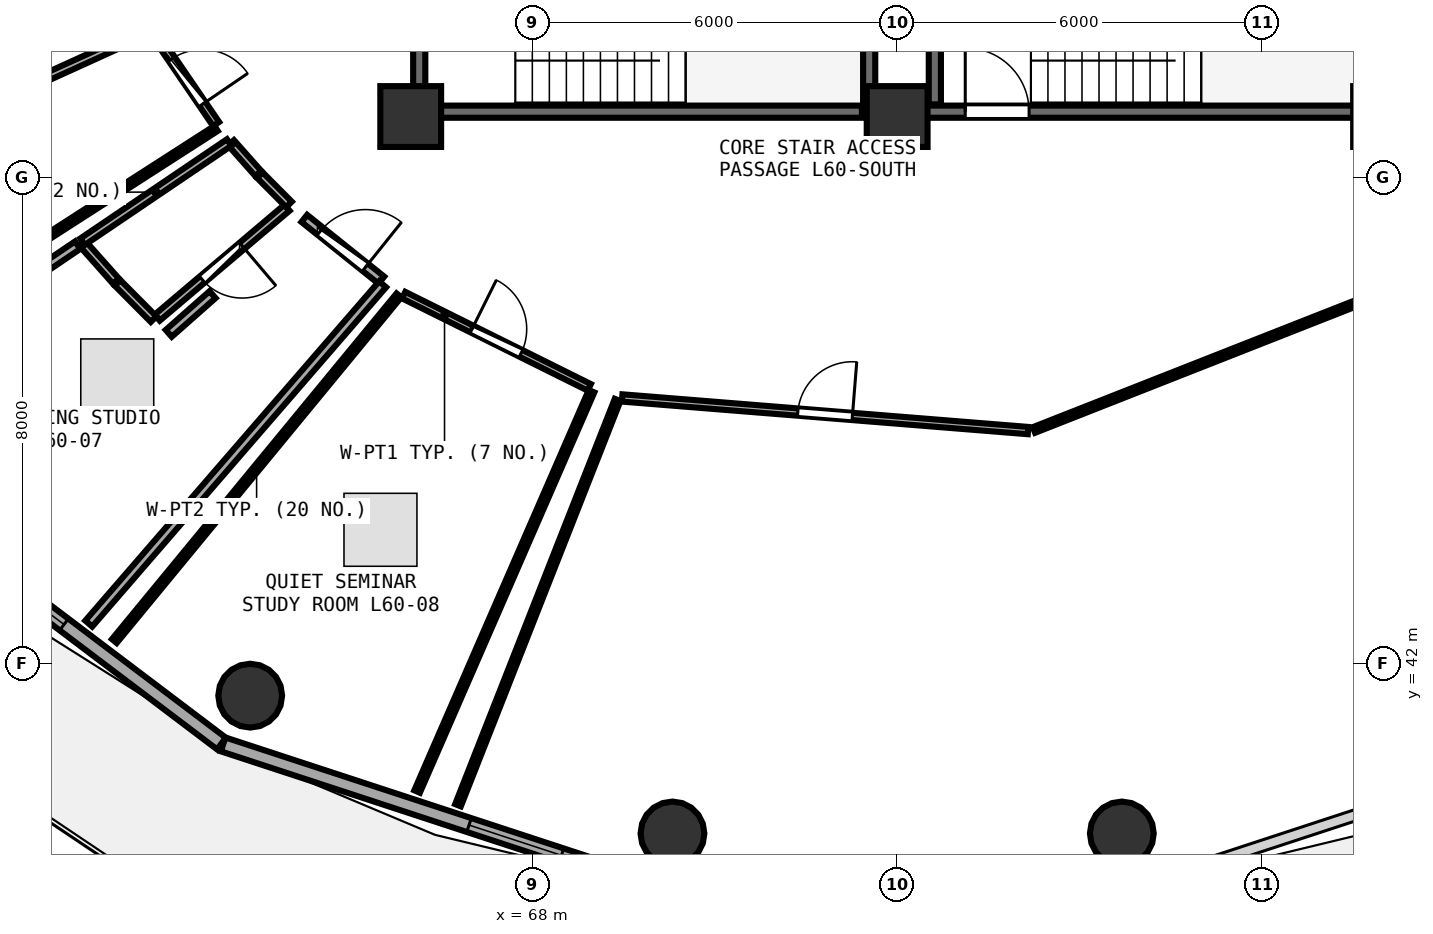
"""IFC4 building model, lengths in metres.
Left out: names, types, materials, properties, quantities, classifications, styles, units other than length and angle.
Written with IfcOpenShell. Run it as: python <this file> out.ifc"""

import sys

from ifc_helpers import new_model, si_unit, direction, frame, frame_2d, origin, origin_2d, place, context, subcontext, project, spatial, rectangle, circle, extrude, element, fill, save


model = new_model("IFC4")
c1 = context("Model", 3, precision=1e-05, world=origin(), true_north=direction((0.0, 1.0)))
c2 = subcontext(c1, "Body", "Model", "MODEL_VIEW")
j1 = project(units=[si_unit("LENGTHUNIT", "METRE"), si_unit("PLANEANGLEUNIT", "RADIAN")], contexts=[c1])
p1 = place(None, origin())
s1 = spatial("IfcSite", under=j1, at=p1, CompositionType="ELEMENT")
p2 = place(p1, origin())
s2 = spatial("IfcBuilding", under=s1, at=p2, CompositionType="ELEMENT")
p3 = place(p2, frame((0.0, 0.0, 234.45)))
s3 = spatial("IfcBuildingStorey", under=s2, at=p3, CompositionType="ELEMENT", Elevation=234.45)
for number, where, z_axis, x_axis in (
    (1, (66.0, 51.0, 0.0), (0.0, 0.0, 1.0), (1.0, 0.0, 0.0)),
    (2, (74.0, 51.0, 0.0), (0.0, 0.0, 1.0), (1.0, 0.0, 0.0)),
):
    element("IfcColumn", number, at=place(p3, frame(where, z_axis=z_axis, x_axis=x_axis)), inside=s3, PredefinedType="PILASTER", context=c2, shape_type="SweptSolid", body=[
        extrude(rectangle(XDim=1.0, YDim=1.0, at=origin_2d()), origin(), (0.0, 0.0, 1.0), 3.75),
    ])
for number, where, z_axis, x_axis in (
    (3, (63.36, 41.476, 0.0), (0.0, 0.0, 1.0), (1.0, 0.0, 0.0)),
    (4, (70.305, 39.21, 0.0), (0.0, 0.0, 1.0), (1.0, 0.0, 0.0)),
    (5, (77.695, 39.21, 0.0), (0.0, 0.0, 1.0), (1.0, 0.0, 0.0)),
):
    element("IfcColumn", number, at=place(p3, frame(where, z_axis=z_axis, x_axis=x_axis)), inside=s3, PredefinedType="COLUMN", context=c2, shape_type="SweptSolid", body=[
        extrude(circle(Radius=0.525, at=origin_2d()), origin(), (0.0, 0.0, 1.0), 3.75),
    ])
p4 = place(p3, frame((57.006, 45.135, 0.0), z_axis=(0.0, 0.0, 1.0), x_axis=(0.797701674595, -0.603052268338, 0.0)))
e6 = element("IfcWall", 6, at=p4, inside=s3, PredefinedType="SOLIDWALL", context=c2, shape_type="SweptSolid", body=[
    extrude(rectangle(XDim=7.374, YDim=0.24, at=frame_2d((3.687, 0.0))), origin(), (0.0, 0.0, 1.0), 3.475),
])
p5 = place(p4, frame((2.527, 0.0, 0.85)))
e7 = element("IfcOpeningElement", 7, at=p5, cuts=e6, PredefinedType="OPENING", context=c2, shape_type="SweptSolid", body=[
    extrude(rectangle(XDim=1.6, YDim=1.45, at=frame_2d((0.8, 0.725))), frame((0.0, 0.13, 0.0), z_axis=(0.0, -1.0, 0.0), x_axis=(1.0, 0.0, 0.0)), (0.0, 0.0, 1.0), 0.26),
])
p6 = place(p3, frame((62.914, 40.675, 0.0), z_axis=(0.0, 0.0, 1.0), x_axis=(0.95022142767, -0.31157541366, 0.0)))
e8 = element("IfcWall", 8, at=p6, inside=s3, PredefinedType="SOLIDWALL", context=c2, shape_type="SweptSolid", body=[
    extrude(rectangle(XDim=7.594, YDim=0.24, at=frame_2d((3.797, 0.0))), origin(), (0.0, 0.0, 1.0), 3.475),
])
p7 = place(p6, frame((4.257, 0.0, 0.85)))
e9 = element("IfcOpeningElement", 9, at=p7, cuts=e8, PredefinedType="OPENING", context=c2, shape_type="SweptSolid", body=[
    extrude(rectangle(XDim=1.6, YDim=1.45, at=frame_2d((0.8, 0.725))), frame((0.0, 0.13, 0.0), z_axis=(0.0, -1.0, 0.0), x_axis=(1.0, 0.0, 0.0)), (0.0, 0.0, 1.0), 0.26),
])
p8 = place(p3, frame((74.0, 51.08, 0.0), z_axis=(0.0, 0.0, 1.0), x_axis=(1.0, 0.0, 0.0)))
e10 = element("IfcWall", 10, at=p8, inside=s3, PredefinedType="SHEAR", context=c2, shape_type="SweptSolid", body=[
    extrude(rectangle(XDim=7.9, YDim=0.2, at=frame_2d((3.95, 0.0))), origin(), (0.0, 0.0, 1.0), 3.49),
])
p9 = place(p8, frame((1.12, 0.0, 0.0)))
e11 = element("IfcOpeningElement", 11, at=p9, cuts=e10, PredefinedType="OPENING", context=c2, shape_type="SweptSolid", body=[
    extrude(rectangle(XDim=1.05, YDim=2.1, at=frame_2d((0.525, 1.05))), frame((0.0, 0.11, 0.0), z_axis=(0.0, -1.0, 0.0), x_axis=(1.0, 0.0, 0.0)), (0.0, 0.0, 1.0), 0.22),
])
p10 = place(p3, frame((74.62, 54.27, 0.0), z_axis=(0.0, 0.0, 1.0), x_axis=(0.0, -1.0, 0.0)))
e12 = element("IfcWall", 12, at=p10, inside=s3, PredefinedType="SHEAR", context=c2, shape_type="SweptSolid", body=[
    extrude(rectangle(XDim=3.07, YDim=0.2, at=frame_2d((1.535, 0.0))), origin(), (0.0, 0.0, 1.0), 3.49),
])
p11 = place(p3, frame((66.26, 51.08, 0.0), z_axis=(0.0, 0.0, 1.0), x_axis=(1.0, 0.0, 0.0)))
e13 = element("IfcWall", 13, at=p11, inside=s3, PredefinedType="SHEAR", context=c2, shape_type="SweptSolid", body=[
    extrude(rectangle(XDim=7.16, YDim=0.2, at=frame_2d((3.58, 0.0))), origin(), (0.0, 0.0, 1.0), 3.49),
])
p12 = place(p3, frame((73.54, 51.2, 0.0), z_axis=(0.0, 0.0, 1.0), x_axis=(0.0, 1.0, 0.0)))
e14 = element("IfcWall", 14, at=p12, inside=s3, PredefinedType="SHEAR", context=c2, shape_type="SweptSolid", body=[
    extrude(rectangle(XDim=3.07, YDim=0.2, at=frame_2d((1.535, 0.0))), origin(), (0.0, 0.0, 1.0), 3.49),
])
p13 = place(p3, frame((66.14, 54.27, 0.0), z_axis=(0.0, 0.0, 1.0), x_axis=(0.0, -1.0, 0.0)))
e15 = element("IfcWall", 15, at=p13, inside=s3, PredefinedType="SHEAR", context=c2, shape_type="SweptSolid", body=[
    extrude(rectangle(XDim=3.07, YDim=0.2, at=frame_2d((1.535, 0.0))), origin(), (0.0, 0.0, 1.0), 3.49),
])
p14 = place(p13, frame((1.01, 0.0, 0.0)))
e16 = element("IfcOpeningElement", 16, at=p14, cuts=e15, PredefinedType="OPENING", context=c2, shape_type="SweptSolid", body=[
    extrude(rectangle(XDim=1.05, YDim=2.1, at=frame_2d((0.525, 1.05))), frame((0.0, 0.11, 0.0), z_axis=(0.0, -1.0, 0.0), x_axis=(1.0, 0.0, 0.0)), (0.0, 0.0, 1.0), 0.22),
])
p15 = place(p3, frame((69.477, 46.372, 0.0), z_axis=(0.0, 0.0, 1.0), x_axis=(0.996785539967, -0.080116086476, 0.0)))
e17 = element("IfcWall", 17, at=p15, inside=s3, PredefinedType="PARTITIONING", context=c2, shape_type="SweptSolid", body=[
    extrude(rectangle(XDim=6.698, YDim=0.12, at=frame_2d((3.349, 0.0))), origin(), (0.0, 0.0, 1.0), 3.025),
])
p16 = place(p15, frame((2.899, 0.0, 0.0)))
e18 = element("IfcOpeningElement", 18, at=p16, cuts=e17, PredefinedType="OPENING", context=c2, shape_type="SweptSolid", body=[
    extrude(rectangle(XDim=0.9, YDim=2.08, at=frame_2d((0.45, 1.04))), frame((0.0, 0.07, 0.0), z_axis=(0.0, -1.0, 0.0), x_axis=(1.0, 0.0, 0.0)), (0.0, 0.0, 1.0), 0.14),
])
p17 = place(p3, frame((61.846, 52.273, 0.0), z_axis=(0.0, 0.0, 1.0), x_axis=(0.563860796601, -0.825869845712, 0.0)))
e19 = element("IfcWall", 19, at=p17, inside=s3, PredefinedType="PARTITIONING", context=c2, shape_type="SweptSolid", body=[
    extrude(rectangle(XDim=1.691, YDim=0.12, at=frame_2d((0.846, 0.0))), origin(), (0.0, 0.0, 1.0), 3.025),
])
p18 = place(p17, frame((0.396, 0.0, 0.0)))
e20 = element("IfcOpeningElement", 20, at=p18, cuts=e19, PredefinedType="OPENING", context=c2, shape_type="SweptSolid", body=[
    extrude(rectangle(XDim=0.9, YDim=2.08, at=frame_2d((0.45, 1.04))), frame((0.0, 0.07, 0.0), z_axis=(0.0, -1.0, 0.0), x_axis=(1.0, 0.0, 0.0)), (0.0, 0.0, 1.0), 0.14),
])
p19 = place(p3, frame((63.966, 49.501, 0.0), z_axis=(0.0, 0.0, 1.0), x_axis=(-0.763141339825, -0.646231611305, 0.0)))
e21 = element("IfcWall", 21, at=p19, inside=s3, PredefinedType="PLUMBINGWALL", context=c2, shape_type="SweptSolid", body=[
    extrude(rectangle(XDim=2.798, YDim=0.13, at=frame_2d((1.399, 0.0))), origin(), (0.0, 0.0, 1.0), 3.025),
])
p20 = place(p19, frame((0.969, 0.0, 0.0)))
e22 = element("IfcOpeningElement", 22, at=p20, cuts=e21, PredefinedType="OPENING", context=c2, shape_type="SweptSolid", body=[
    extrude(rectangle(XDim=0.86, YDim=2.05, at=frame_2d((0.43, 1.025))), frame((0.0, 0.075, 0.0), z_axis=(0.0, -1.0, 0.0), x_axis=(1.0, 0.0, 0.0)), (0.0, 0.0, 1.0), 0.15),
])
p21 = place(p3, frame((64.25, 49.324, 0.0), z_axis=(0.0, 0.0, 1.0), x_axis=(0.780560643324, -0.625080060547, 0.0)))
e23 = element("IfcWall", 23, at=p21, inside=s3, PredefinedType="PARTITIONING", context=c2, shape_type="SweptSolid", body=[
    extrude(rectangle(XDim=1.624, YDim=0.15, at=frame_2d((0.812, 0.0))), origin(), (0.0, 0.0, 1.0), 3.025),
])
p22 = place(p21, frame((0.337, 0.0, 0.0)))
e24 = element("IfcOpeningElement", 24, at=p22, cuts=e23, PredefinedType="OPENING", context=c2, shape_type="SweptSolid", body=[
    extrude(rectangle(XDim=0.95, YDim=2.08, at=frame_2d((0.475, 1.04))), frame((0.0, 0.085, 0.0), z_axis=(0.0, -1.0, 0.0), x_axis=(1.0, 0.0, 0.0)), (0.0, 0.0, 1.0), 0.17),
])
p23 = place(p3, frame((65.885, 48.063, 0.0), z_axis=(0.0, 0.0, 1.0), x_axis=(0.895499293581, -0.445062933973, 0.0)))
e25 = element("IfcWall", 25, at=p23, inside=s3, PredefinedType="PARTITIONING", context=c2, shape_type="SweptSolid", body=[
    extrude(rectangle(XDim=3.408, YDim=0.12, at=frame_2d((1.704, 0.0))), origin(), (0.0, 0.0, 1.0), 3.235),
])
p24 = place(p23, frame((1.254, 0.0, 0.0)))
e26 = element("IfcOpeningElement", 26, at=p24, cuts=e25, PredefinedType="OPENING", context=c2, shape_type="SweptSolid", body=[
    extrude(rectangle(XDim=0.9, YDim=2.08, at=frame_2d((0.45, 1.04))), frame((0.0, 0.07, 0.0), z_axis=(0.0, -1.0, 0.0), x_axis=(1.0, 0.0, 0.0)), (0.0, 0.0, 1.0), 0.14),
])
p25 = place(p3, frame((76.25, 45.846, 0.0), z_axis=(0.0, 0.0, 1.0), x_axis=(0.93054786628, 0.366170272635, 0.0)))
e27 = element("IfcWall", 27, at=p25, inside=s3, PredefinedType="PARTITIONING", context=c2, shape_type="SweptSolid", body=[
    extrude(rectangle(XDim=6.635, YDim=0.1, at=frame_2d((3.318, 0.0))), origin(), (0.0, 0.0, 1.0), 3.235),
])
p26 = place(p3, frame((66.778, 39.674, 0.0), z_axis=(0.0, 0.0, 1.0), x_axis=(0.366396673382, 0.930458745853, 0.0)))
e28 = element("IfcWall", 28, at=p26, inside=s3, PredefinedType="PARTITIONING", context=c2, shape_type="SweptSolid", body=[
    extrude(rectangle(XDim=7.164, YDim=0.1, at=frame_2d((3.582, 0.0))), origin(), (0.0, 0.0, 1.0), 3.075),
])
p27 = place(p3, frame((60.985, 53.961, 0.0), z_axis=(0.0, 0.0, 1.0), x_axis=(-0.954952218503, -0.29675960031, 0.0)))
e29 = element("IfcWall", 29, at=p27, inside=s3, PredefinedType="PARTITIONING", context=c2, shape_type="SweptSolid", body=[
    extrude(rectangle(XDim=6.946, YDim=0.1, at=frame_2d((3.473, 0.0))), origin(), (0.0, 0.0, 1.0), 3.175),
])
p28 = place(p3, frame((61.728, 52.43, 0.0), z_axis=(0.0, 0.0, 1.0), x_axis=(-0.910394340166, -0.413741640874, 0.0)))
e30 = element("IfcWall", 30, at=p28, inside=s3, PredefinedType="PLUMBINGWALL", context=c2, shape_type="SweptSolid", body=[
    extrude(rectangle(XDim=3.0, YDim=0.13, at=frame_2d((1.5, 0.0))), origin(), (0.0, 0.0, 1.0), 3.025),
])
p29 = place(p3, frame((62.799, 50.805, 0.0), z_axis=(0.0, 0.0, 1.0), x_axis=(-0.841021030646, -0.541002426992, 0.0)))
e31 = element("IfcWall", 31, at=p29, inside=s3, PredefinedType="PARTITIONING", context=c2, shape_type="SweptSolid", body=[
    extrude(rectangle(XDim=7.609, YDim=0.1, at=frame_2d((3.805, 0.0))), origin(), (0.0, 0.0, 1.0), 3.075),
])
p30 = place(p3, frame((63.044, 50.569, 0.0), z_axis=(0.0, 0.0, 1.0), x_axis=(0.663846659507, -0.74786871352, 0.0)))
e32 = element("IfcWall", 32, at=p30, inside=s3, PredefinedType="PLUMBINGWALL", context=c2, shape_type="SweptSolid", body=[
    extrude(rectangle(XDim=0.674, YDim=0.13, at=frame_2d((0.337, 0.0))), origin(), (0.0, 0.0, 1.0), 3.48),
])
p31 = place(p3, frame((63.519, 50.036, 0.0), z_axis=(0.0, 0.0, 1.0), x_axis=(0.704946592253, -0.70926039088, 0.0)))
e33 = element("IfcWall", 33, at=p31, inside=s3, PredefinedType="PLUMBINGWALL", context=c2, shape_type="SweptSolid", body=[
    extrude(rectangle(XDim=0.679, YDim=0.13, at=frame_2d((0.34, 0.0))), origin(), (0.0, 0.0, 1.0), 3.025),
])
p32 = place(p3, frame((61.771, 47.668, 0.0), z_axis=(0.0, 0.0, 1.0), x_axis=(-0.704918740806, 0.709288071844, 0.0)))
e34 = element("IfcWall", 34, at=p32, inside=s3, PredefinedType="PLUMBINGWALL", context=c2, shape_type="SweptSolid", body=[
    extrude(rectangle(XDim=0.838, YDim=0.13, at=frame_2d((0.419, 0.0))), origin(), (0.0, 0.0, 1.0), 3.025),
])
p33 = place(p3, frame((61.153, 48.292, 0.0), z_axis=(0.0, 0.0, 1.0), x_axis=(-0.663963631636, 0.747764866696, 0.0)))
e35 = element("IfcWall", 35, at=p33, inside=s3, PredefinedType="PLUMBINGWALL", context=c2, shape_type="SweptSolid", body=[
    extrude(rectangle(XDim=0.833, YDim=0.13, at=frame_2d((0.417, 0.0))), origin(), (0.0, 0.0, 1.0), 3.48),
])
p34 = place(p3, frame((60.603, 48.941, 0.0), z_axis=(0.0, 0.0, 1.0), x_axis=(0.828277690913, 0.560317826538, 0.0)))
e36 = element("IfcWall", 36, at=p34, inside=s3, PredefinedType="PLUMBINGWALL", context=c2, shape_type="SweptSolid", body=[
    extrude(rectangle(XDim=2.912, YDim=0.13, at=frame_2d((1.456, 0.0))), origin(), (0.0, 0.0, 1.0), 3.235),
])
p35 = place(p3, frame((65.538, 48.242, 0.0), z_axis=(0.0, 0.0, 1.0), x_axis=(-0.654642167947, -0.755938907549, 0.0)))
e37 = element("IfcWall", 37, at=p35, inside=s3, PredefinedType="PARTITIONING", context=c2, shape_type="SweptSolid", body=[
    extrude(rectangle(XDim=7.382, YDim=0.15, at=frame_2d((3.691, 0.0))), origin(), (0.0, 0.0, 1.0), 3.025),
])
p36 = place(p3, frame((56.713, 46.305, 0.0), z_axis=(0.0, 0.0, 1.0), x_axis=(0.828059419786, 0.560640345768, 0.0)))
e38 = element("IfcWall", 38, at=p36, inside=s3, PredefinedType="PARTITIONING", context=c2, shape_type="SweptSolid", body=[
    extrude(rectangle(XDim=4.599, YDim=0.15, at=frame_2d((2.299, 0.0))), origin(), (0.0, 0.0, 1.0), 3.075),
])
p37 = place(p3, frame((62.02, 47.435, 0.0), z_axis=(0.0, 0.0, 1.0), x_axis=(0.749645272156, 0.661839834049, 0.0)))
e39 = element("IfcWall", 39, at=p37, inside=s3, PredefinedType="PARTITIONING", context=c2, shape_type="SweptSolid", body=[
    extrude(rectangle(XDim=0.962, YDim=0.15, at=frame_2d((0.481, 0.0))), origin(), (0.0, 0.0, 1.0), 3.48),
])
p38 = place(p3, frame((68.974, 46.483, 0.0), z_axis=(0.0, 0.0, 1.0), x_axis=(-0.399504113712, -0.916731401844, 0.0)))
e40 = element("IfcWall", 40, at=p38, inside=s3, PredefinedType="PARTITIONING", context=c2, shape_type="SweptSolid", body=[
    extrude(rectangle(XDim=7.182, YDim=0.1, at=frame_2d((3.591, 0.0))), origin(), (0.0, 0.0, 1.0), 3.075),
])
p39 = place(p3, frame((61.125, 42.374, 0.0), z_axis=(0.0, 0.0, 1.0), x_axis=(0.635558493253, 0.772052719478, 0.0)))
e41 = element("IfcWall", 41, at=p39, inside=s3, PredefinedType="PARTITIONING", context=c2, shape_type="SweptSolid", body=[
    extrude(rectangle(XDim=7.364, YDim=0.1, at=frame_2d((3.682, 0.0))), origin(), (0.0, 0.0, 1.0), 3.025),
])
p40 = place(p5, origin())
e42 = element("IfcWindow", 42, at=p40, inside=s3, PartitioningType="SINGLE_PANEL", PredefinedType="WINDOW", context=c2, shape_type="SweptSolid", body=[
    extrude(rectangle(XDim=1.6, YDim=1.45, at=frame_2d((0.8, 0.725))), frame((0.0, 0.03, 0.0), z_axis=(0.0, -1.0, 0.0), x_axis=(1.0, 0.0, 0.0)), (0.0, 0.0, 1.0), 0.06),
])
fill(e7, e42)
p41 = place(p7, origin())
e43 = element("IfcWindow", 43, at=p41, inside=s3, PartitioningType="SINGLE_PANEL", PredefinedType="WINDOW", context=c2, shape_type="SweptSolid", body=[
    extrude(rectangle(XDim=1.6, YDim=1.45, at=frame_2d((0.8, 0.725))), frame((0.0, 0.03, 0.0), z_axis=(0.0, -1.0, 0.0), x_axis=(1.0, 0.0, 0.0)), (0.0, 0.0, 1.0), 0.06),
])
fill(e9, e43)
p42 = place(p9, origin())
e44 = element("IfcDoor", 44, at=p42, inside=s3, OperationType="SINGLE_SWING_LEFT", PredefinedType="DOOR", context=c2, shape_type="SweptSolid", body=[
    extrude(rectangle(XDim=1.05, YDim=2.1, at=frame_2d((0.525, 1.05))), frame((0.0, 0.025, 0.0), z_axis=(0.0, -1.0, 0.0), x_axis=(1.0, 0.0, 0.0)), (0.0, 0.0, 1.0), 0.05),
])
fill(e11, e44)
p43 = place(p16, origin())
e45 = element("IfcDoor", 45, at=p43, inside=s3, OperationType="SINGLE_SWING_RIGHT", PredefinedType="DOOR", context=c2, shape_type="SweptSolid", body=[
    extrude(rectangle(XDim=0.9, YDim=2.08, at=frame_2d((0.45, 1.04))), frame((0.0, 0.025, 0.0), z_axis=(0.0, -1.0, 0.0), x_axis=(1.0, 0.0, 0.0)), (0.0, 0.0, 1.0), 0.05),
])
fill(e18, e45)
p44 = place(p18, origin())
e46 = element("IfcDoor", 46, at=p44, inside=s3, OperationType="SINGLE_SWING_RIGHT", PredefinedType="DOOR", context=c2, shape_type="SweptSolid", body=[
    extrude(rectangle(XDim=0.9, YDim=2.08, at=frame_2d((0.45, 1.04))), frame((0.0, 0.025, 0.0), z_axis=(0.0, -1.0, 0.0), x_axis=(1.0, 0.0, 0.0)), (0.0, 0.0, 1.0), 0.05),
])
fill(e20, e46)
p45 = place(p20, origin())
e47 = element("IfcDoor", 47, at=p45, inside=s3, OperationType="SINGLE_SWING_LEFT", PredefinedType="DOOR", context=c2, shape_type="SweptSolid", body=[
    extrude(rectangle(XDim=0.86, YDim=2.05, at=frame_2d((0.43, 1.025))), frame((0.0, 0.025, 0.0), z_axis=(0.0, -1.0, 0.0), x_axis=(1.0, 0.0, 0.0)), (0.0, 0.0, 1.0), 0.05),
])
fill(e22, e47)
p46 = place(p22, origin())
e48 = element("IfcDoor", 48, at=p46, inside=s3, OperationType="SINGLE_SWING_RIGHT", PredefinedType="DOOR", context=c2, shape_type="SweptSolid", body=[
    extrude(rectangle(XDim=0.95, YDim=2.08, at=frame_2d((0.475, 1.04))), frame((0.0, 0.025, 0.0), z_axis=(0.0, -1.0, 0.0), x_axis=(1.0, 0.0, 0.0)), (0.0, 0.0, 1.0), 0.05),
])
fill(e24, e48)
p47 = place(p24, origin())
e49 = element("IfcDoor", 49, at=p47, inside=s3, OperationType="SINGLE_SWING_LEFT", PredefinedType="DOOR", context=c2, shape_type="SweptSolid", body=[
    extrude(rectangle(XDim=0.9, YDim=2.08, at=frame_2d((0.45, 1.04))), frame((0.0, 0.025, 0.0), z_axis=(0.0, -1.0, 0.0), x_axis=(1.0, 0.0, 0.0)), (0.0, 0.0, 1.0), 0.05),
])
fill(e26, e49)
save(model, sys.argv[1])
